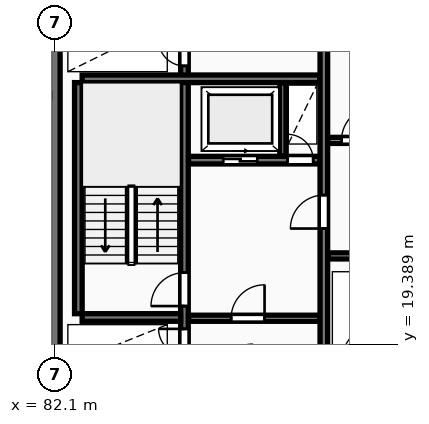
"""IFC4 building model, lengths in metres.
Left out: names, types, materials, properties, quantities, classifications, styles, units other than length and angle.
Written with IfcOpenShell. Run it as: python <this file> out.ifc"""

import sys

from ifc_helpers import new_model, si_unit, direction, frame, frame_2d, origin, place, context, subcontext, project, spatial, rectangle, extrude, element, fill, save


model = new_model("IFC4")
c1 = context("Model", 3, precision=1e-05, world=origin(), true_north=direction((0.0, 1.0)))
c2 = subcontext(c1, "Body", "Model", "MODEL_VIEW")
j1 = project(units=[si_unit("LENGTHUNIT", "METRE"), si_unit("PLANEANGLEUNIT", "RADIAN")], contexts=[c1])
p1 = place(None, origin())
s1 = spatial("IfcSite", under=j1, at=p1, CompositionType="ELEMENT")
p2 = place(p1, origin())
s2 = spatial("IfcBuilding", under=s1, at=p2, CompositionType="ELEMENT")
p3 = place(p2, frame((0.0, 0.0, 139.3)))
s3 = spatial("IfcBuildingStorey", under=s2, at=p3, CompositionType="ELEMENT", Elevation=139.3)
p4 = place(p3, frame((82.1, 18.575, 0.0), z_axis=(0.0, 0.0, 1.0), x_axis=(0.0, 1.0, 0.0)))
e1 = element("IfcWall", 1, at=p4, inside=s3, PredefinedType="SHEAR", context=c2, shape_type="SweptSolid", body=[
    extrude(rectangle(XDim=11.65, YDim=0.35, at=frame_2d((5.825, 0.0))), origin(), (0.0, 0.0, 1.0), 3.6),
])
p5 = place(p3, frame((82.875, 20.4, 0.0), z_axis=(0.0, 0.0, 1.0), x_axis=(0.0, 1.0, 0.0)))
e2 = element("IfcWall", 2, at=p5, inside=s3, PredefinedType="SHEAR", context=c2, shape_type="SweptSolid", body=[
    extrude(rectangle(XDim=7.6, YDim=0.25, at=frame_2d((3.8, 0.0))), origin(), (0.0, 0.0, 1.0), 3.6),
])
p6 = place(p3, frame((86.365, 18.6, 0.0), z_axis=(0.0, 0.0, 1.0), x_axis=(0.0, 1.0, 0.0)))
e3 = element("IfcWall", 3, at=p6, inside=s3, PredefinedType="SHEAR", context=c2, shape_type="SweptSolid", body=[
    extrude(rectangle(XDim=11.6, YDim=0.25, at=frame_2d((5.8, 0.0))), origin(), (0.0, 0.0, 1.0), 3.6),
])
p7 = place(p6, frame((0.45, 0.0, 0.0)))
e4 = element("IfcOpeningElement", 4, at=p7, cuts=e3, PredefinedType="OPENING", context=c2, shape_type="SweptSolid", body=[
    extrude(rectangle(XDim=0.85, YDim=2.05, at=frame_2d((0.425, 1.025))), frame((0.0, 0.135, 0.0), z_axis=(0.0, -1.0, 0.0), x_axis=(1.0, 0.0, 0.0)), (0.0, 0.0, 1.0), 0.27),
])
p8 = place(p6, frame((2.05, 0.0, 0.0)))
e5 = element("IfcOpeningElement", 5, at=p8, cuts=e3, PredefinedType="OPENING", context=c2, shape_type="SweptSolid", body=[
    extrude(rectangle(XDim=1.1, YDim=2.1, at=frame_2d((0.55, 1.05))), frame((0.0, 0.135, 0.0), z_axis=(0.0, -1.0, 0.0), x_axis=(1.0, 0.0, 0.0)), (0.0, 0.0, 1.0), 0.27),
])
p9 = place(p6, frame((9.95, 0.0, 0.0)))
e6 = element("IfcOpeningElement", 6, at=p9, cuts=e3, PredefinedType="OPENING", context=c2, shape_type="SweptSolid", body=[
    extrude(rectangle(XDim=0.85, YDim=2.05, at=frame_2d((0.425, 1.025))), frame((0.0, 0.135, 0.0), z_axis=(0.0, -1.0, 0.0), x_axis=(1.0, 0.0, 0.0)), (0.0, 0.0, 1.0), 0.27),
])
p10 = place(p3, frame((83.0, 20.275, 0.0), z_axis=(0.0, 0.0, 1.0), x_axis=(1.0, 0.0, 0.0)))
e7 = element("IfcWall", 7, at=p10, inside=s3, PredefinedType="SHEAR", context=c2, shape_type="SweptSolid", body=[
    extrude(rectangle(XDim=3.24, YDim=0.25, at=frame_2d((1.62, 0.0))), origin(), (0.0, 0.0, 1.0), 3.6),
])
p11 = place(p3, frame((83.0, 28.125, 0.0), z_axis=(0.0, 0.0, 1.0), x_axis=(1.0, 0.0, 0.0)))
e8 = element("IfcWall", 8, at=p11, inside=s3, PredefinedType="SHEAR", context=c2, shape_type="SweptSolid", body=[
    extrude(rectangle(XDim=7.82, YDim=0.25, at=frame_2d((3.91, 0.0))), origin(), (0.0, 0.0, 1.0), 3.6),
])
p12 = place(p3, frame((86.5, 25.45, 0.0), z_axis=(0.0, 0.0, 1.0), x_axis=(1.0, 0.0, 0.0)))
e9 = element("IfcWall", 9, at=p12, inside=s3, PredefinedType="SHEAR", context=c2, shape_type="SweptSolid", body=[
    extrude(rectangle(XDim=4.32, YDim=0.25, at=frame_2d((2.16, 0.0))), origin(), (0.0, 0.0, 1.0), 3.6),
])
p13 = place(p12, frame((1.14, 0.0, 0.0)))
e10 = element("IfcOpeningElement", 10, at=p13, cuts=e9, PredefinedType="OPENING", context=c2, shape_type="SweptSolid", body=[
    extrude(rectangle(XDim=1.12, YDim=2.12, at=frame_2d((0.56, 1.06))), frame((0.0, 0.135, 0.0), z_axis=(0.0, -1.0, 0.0), x_axis=(1.0, 0.0, 0.0)), (0.0, 0.0, 1.0), 0.27),
])
p14 = place(p12, frame((3.25, 0.0, 0.0)))
e11 = element("IfcOpeningElement", 11, at=p14, cuts=e9, PredefinedType="OPENING", context=c2, shape_type="SweptSolid", body=[
    extrude(rectangle(XDim=0.85, YDim=2.05, at=frame_2d((0.425, 1.025))), frame((0.0, 0.135, 0.0), z_axis=(0.0, -1.0, 0.0), x_axis=(1.0, 0.0, 0.0)), (0.0, 0.0, 1.0), 0.27),
])
p15 = place(p3, frame((89.6, 25.58, 0.0), z_axis=(0.0, 0.0, 1.0), x_axis=(0.0, 1.0, 0.0)))
e12 = element("IfcWall", 12, at=p15, inside=s3, PredefinedType="PARTITIONING", context=c2, shape_type="SweptSolid", body=[
    extrude(rectangle(XDim=2.42, YDim=0.2, at=frame_2d((1.21, 0.0))), origin(), (0.0, 0.0, 1.0), 3.31),
])
p16 = place(p3, frame((86.5, 20.25, 0.0), z_axis=(0.0, 0.0, 1.0), x_axis=(1.0, 0.0, 0.0)))
e13 = element("IfcWall", 13, at=p16, inside=s3, PredefinedType="PARTITIONING", context=c2, shape_type="SweptSolid", body=[
    extrude(rectangle(XDim=4.32, YDim=0.2, at=frame_2d((2.16, 0.0))), origin(), (0.0, 0.0, 1.0), 3.31),
])
p17 = place(p16, frame((1.4, 0.0, 0.0)))
e14 = element("IfcOpeningElement", 14, at=p17, cuts=e13, PredefinedType="OPENING", context=c2, shape_type="SweptSolid", body=[
    extrude(rectangle(XDim=1.1, YDim=2.1, at=frame_2d((0.55, 1.05))), frame((0.0, 0.11, 0.0), z_axis=(0.0, -1.0, 0.0), x_axis=(1.0, 0.0, 0.0)), (0.0, 0.0, 1.0), 0.22),
])
p18 = place(p3, frame((90.95, 18.6, 0.0), z_axis=(0.0, 0.0, 1.0), x_axis=(0.0, 1.0, 0.0)))
e15 = element("IfcWall", 15, at=p18, inside=s3, PredefinedType="SHEAR", context=c2, shape_type="SweptSolid", body=[
    extrude(rectangle(XDim=11.6, YDim=0.25, at=frame_2d((5.8, 0.0))), origin(), (0.0, 0.0, 1.0), 3.6),
])
p19 = place(p18, frame((4.6, 0.0, 0.0)))
e16 = element("IfcOpeningElement", 16, at=p19, cuts=e15, PredefinedType="OPENING", context=c2, shape_type="SweptSolid", body=[
    extrude(rectangle(XDim=1.1, YDim=2.1, at=frame_2d((0.55, 1.05))), frame((0.0, 0.135, 0.0), z_axis=(0.0, -1.0, 0.0), x_axis=(1.0, 0.0, 0.0)), (0.0, 0.0, 1.0), 0.27),
])
p20 = place(p3, frame((91.08, 26.1, 0.0), z_axis=(0.0, 0.0, 1.0), x_axis=(1.0, 0.0, 0.0)))
e17 = element("IfcWall", 17, at=p20, inside=s3, PredefinedType="PARTITIONING", context=c2, shape_type="SweptSolid", body=[
    extrude(rectangle(XDim=8.34, YDim=0.2, at=frame_2d((4.17, 0.0))), origin(), (0.0, 0.0, 1.0), 3.31),
])
p21 = place(p20, frame((0.45, 0.0, 0.0)))
e18 = element("IfcOpeningElement", 18, at=p21, cuts=e17, PredefinedType="OPENING", context=c2, shape_type="SweptSolid", body=[
    extrude(rectangle(XDim=1.1, YDim=2.1, at=frame_2d((0.55, 1.05))), frame((0.0, 0.11, 0.0), z_axis=(0.0, -1.0, 0.0), x_axis=(1.0, 0.0, 0.0)), (0.0, 0.0, 1.0), 0.22),
])
p22 = place(p20, frame((4.6, 0.0, 0.0)))
e19 = element("IfcOpeningElement", 19, at=p22, cuts=e17, PredefinedType="OPENING", context=c2, shape_type="SweptSolid", body=[
    extrude(rectangle(XDim=0.92, YDim=2.08, at=frame_2d((0.46, 1.04))), frame((0.0, 0.11, 0.0), z_axis=(0.0, -1.0, 0.0), x_axis=(1.0, 0.0, 0.0)), (0.0, 0.0, 1.0), 0.22),
])
p23 = place(p3, frame((91.08, 22.3, 0.0), z_axis=(0.0, 0.0, 1.0), x_axis=(1.0, 0.0, 0.0)))
e20 = element("IfcWall", 20, at=p23, inside=s3, PredefinedType="PARTITIONING", context=c2, shape_type="SweptSolid", body=[
    extrude(rectangle(XDim=19.14, YDim=0.2, at=frame_2d((9.57, 0.0))), origin(), (0.0, 0.0, 1.0), 3.31),
])
p24 = place(p23, frame((1.15, 0.0, 0.0)))
e21 = element("IfcOpeningElement", 21, at=p24, cuts=e20, PredefinedType="OPENING", context=c2, shape_type="SweptSolid", body=[
    extrude(rectangle(XDim=0.85, YDim=2.05, at=frame_2d((0.425, 1.025))), frame((0.0, 0.11, 0.0), z_axis=(0.0, -1.0, 0.0), x_axis=(1.0, 0.0, 0.0)), (0.0, 0.0, 1.0), 0.22),
])
p25 = place(p23, frame((3.2, 0.0, 0.0)))
e22 = element("IfcOpeningElement", 22, at=p25, cuts=e20, PredefinedType="OPENING", context=c2, shape_type="SweptSolid", body=[
    extrude(rectangle(XDim=0.85, YDim=2.05, at=frame_2d((0.425, 1.025))), frame((0.0, 0.11, 0.0), z_axis=(0.0, -1.0, 0.0), x_axis=(1.0, 0.0, 0.0)), (0.0, 0.0, 1.0), 0.22),
])
p26 = place(p23, frame((12.72, 0.0, 0.0)))
e23 = element("IfcOpeningElement", 23, at=p26, cuts=e20, PredefinedType="OPENING", context=c2, shape_type="SweptSolid", body=[
    extrude(rectangle(XDim=1.5, YDim=2.2, at=frame_2d((0.75, 1.1))), frame((0.0, 0.11, 0.0), z_axis=(0.0, -1.0, 0.0), x_axis=(1.0, 0.0, 0.0)), (0.0, 0.0, 1.0), 0.22),
])
p27 = place(p23, frame((6.42, 0.0, 0.0)))
e24 = element("IfcOpeningElement", 24, at=p27, cuts=e20, PredefinedType="OPENING", context=c2, shape_type="SweptSolid", body=[
    extrude(rectangle(XDim=0.92, YDim=2.08, at=frame_2d((0.46, 1.04))), frame((0.0, 0.11, 0.0), z_axis=(0.0, -1.0, 0.0), x_axis=(1.0, 0.0, 0.0)), (0.0, 0.0, 1.0), 0.22),
])
p28 = place(p23, frame((15.92, 0.0, 0.0)))
e25 = element("IfcOpeningElement", 25, at=p28, cuts=e20, PredefinedType="OPENING", context=c2, shape_type="SweptSolid", body=[
    extrude(rectangle(XDim=0.88, YDim=2.06, at=frame_2d((0.44, 1.03))), frame((0.0, 0.11, 0.0), z_axis=(0.0, -1.0, 0.0), x_axis=(1.0, 0.0, 0.0)), (0.0, 0.0, 1.0), 0.22),
])
p29 = place(p7, origin())
e26 = element("IfcDoor", 26, at=p29, inside=s3, OperationType="SINGLE_SWING_RIGHT", PredefinedType="DOOR", context=c2, shape_type="SweptSolid", body=[
    extrude(rectangle(XDim=0.85, YDim=2.05, at=frame_2d((0.425, 1.025))), frame((0.0, 0.025, 0.0), z_axis=(0.0, -1.0, 0.0), x_axis=(1.0, 0.0, 0.0)), (0.0, 0.0, 1.0), 0.05),
])
fill(e4, e26)
p30 = place(p8, origin())
e27 = element("IfcDoor", 27, at=p30, inside=s3, OperationType="SINGLE_SWING_LEFT", PredefinedType="DOOR", context=c2, shape_type="SweptSolid", body=[
    extrude(rectangle(XDim=1.1, YDim=2.1, at=frame_2d((0.55, 1.05))), frame((0.0, 0.025, 0.0), z_axis=(0.0, -1.0, 0.0), x_axis=(1.0, 0.0, 0.0)), (0.0, 0.0, 1.0), 0.05),
])
fill(e5, e27)
p31 = place(p9, origin())
e28 = element("IfcDoor", 28, at=p31, inside=s3, OperationType="SINGLE_SWING_RIGHT", PredefinedType="DOOR", context=c2, shape_type="SweptSolid", body=[
    extrude(rectangle(XDim=0.85, YDim=2.05, at=frame_2d((0.425, 1.025))), frame((0.0, 0.025, 0.0), z_axis=(0.0, -1.0, 0.0), x_axis=(1.0, 0.0, 0.0)), (0.0, 0.0, 1.0), 0.05),
])
fill(e6, e28)
p32 = place(p13, origin())
e29 = element("IfcDoor", 29, at=p32, inside=s3, OperationType="SLIDING_TO_RIGHT", PredefinedType="DOOR", context=c2, shape_type="SweptSolid", body=[
    extrude(rectangle(XDim=1.12, YDim=2.12, at=frame_2d((0.56, 1.06))), frame((0.0, 0.025, 0.0), z_axis=(0.0, -1.0, 0.0), x_axis=(1.0, 0.0, 0.0)), (0.0, 0.0, 1.0), 0.05),
])
fill(e10, e29)
p33 = place(p14, origin())
e30 = element("IfcDoor", 30, at=p33, inside=s3, OperationType="SINGLE_SWING_LEFT", PredefinedType="DOOR", context=c2, shape_type="SweptSolid", body=[
    extrude(rectangle(XDim=0.85, YDim=2.05, at=frame_2d((0.425, 1.025))), frame((0.0, 0.025, 0.0), z_axis=(0.0, -1.0, 0.0), x_axis=(1.0, 0.0, 0.0)), (0.0, 0.0, 1.0), 0.05),
])
fill(e11, e30)
p34 = place(p17, origin())
e31 = element("IfcDoor", 31, at=p34, inside=s3, OperationType="SINGLE_SWING_RIGHT", PredefinedType="DOOR", context=c2, shape_type="SweptSolid", body=[
    extrude(rectangle(XDim=1.1, YDim=2.1, at=frame_2d((0.55, 1.05))), frame((0.0, 0.025, 0.0), z_axis=(0.0, -1.0, 0.0), x_axis=(1.0, 0.0, 0.0)), (0.0, 0.0, 1.0), 0.05),
])
fill(e14, e31)
p35 = place(p19, origin())
e32 = element("IfcDoor", 32, at=p35, inside=s3, OperationType="SINGLE_SWING_LEFT", PredefinedType="DOOR", context=c2, shape_type="SweptSolid", body=[
    extrude(rectangle(XDim=1.1, YDim=2.1, at=frame_2d((0.55, 1.05))), frame((0.0, 0.025, 0.0), z_axis=(0.0, -1.0, 0.0), x_axis=(1.0, 0.0, 0.0)), (0.0, 0.0, 1.0), 0.05),
])
fill(e16, e32)
p36 = place(p21, origin())
e33 = element("IfcDoor", 33, at=p36, inside=s3, OperationType="SINGLE_SWING_RIGHT", PredefinedType="DOOR", context=c2, shape_type="SweptSolid", body=[
    extrude(rectangle(XDim=1.1, YDim=2.1, at=frame_2d((0.55, 1.05))), frame((0.0, 0.025, 0.0), z_axis=(0.0, -1.0, 0.0), x_axis=(1.0, 0.0, 0.0)), (0.0, 0.0, 1.0), 0.05),
])
fill(e18, e33)
save(model, sys.argv[1])
